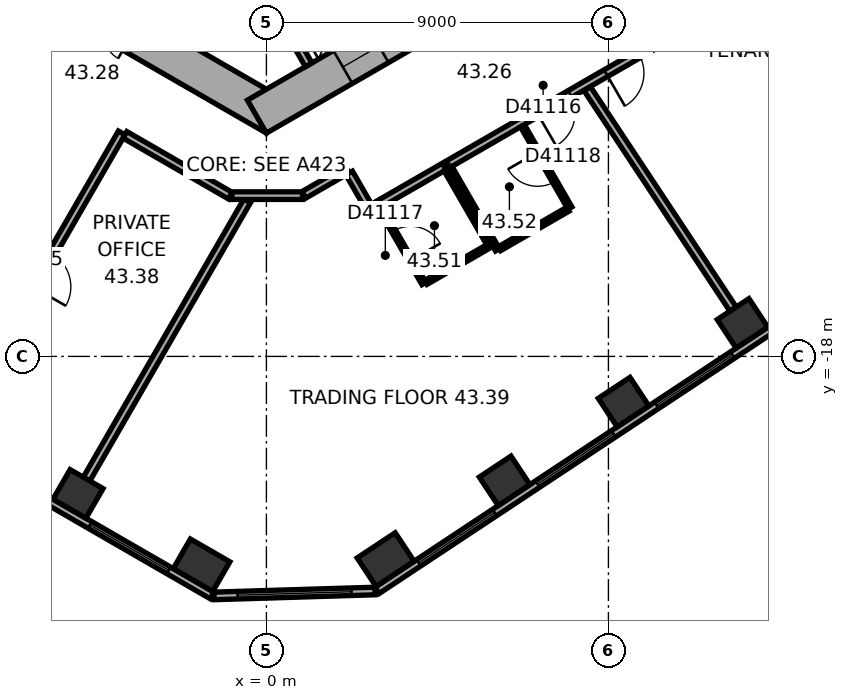
"""IFC4 building model, lengths in metres.
Left out: names, types, materials, properties, quantities, classifications, styles, units other than length and angle.
Written with IfcOpenShell. Run it as: python <this file> out.ifc"""

import sys

from ifc_helpers import new_model, si_unit, direction, frame, frame_2d, origin, origin_2d, place, context, subcontext, project, spatial, rectangle, extrude, element, fill, save


model = new_model("IFC4")
c1 = context("Model", 3, precision=1e-05, world=origin(), true_north=direction((0.0, 1.0)))
c2 = subcontext(c1, "Body", "Model", "MODEL_VIEW")
j1 = project(units=[si_unit("LENGTHUNIT", "METRE"), si_unit("PLANEANGLEUNIT", "RADIAN")], contexts=[c1])
p1 = place(None, origin())
s1 = spatial("IfcSite", under=j1, at=p1, CompositionType="ELEMENT")
p2 = place(p1, origin())
s2 = spatial("IfcBuilding", under=s1, at=p2, CompositionType="ELEMENT")
p3 = place(p2, frame((0.0, 0.0, 176.2)))
s3 = spatial("IfcBuildingStorey", under=s2, at=p3, CompositionType="ELEMENT", Elevation=176.2)
p4 = place(p3, frame((-4.958, -21.617, 0.0), z_axis=(0.0, 0.0, 1.0), x_axis=(0.866025403784, -0.5, 0.0)))
e1 = element("IfcColumn", 1, at=p4, inside=s3, PredefinedType="COLUMN", context=c2, shape_type="SweptSolid", body=[
    extrude(rectangle(XDim=1.0, YDim=0.9, at=origin_2d()), origin(), (0.0, 0.0, 1.0), 3.7),
])
for number, where, z_axis, x_axis in (
    (2, (-1.706, -23.494, 0.0), (0.0, 0.0, 1.0), (0.866, -0.5, 0.0)),
    (3, (3.137, -23.346, 0.0), (0.0, 0.0, 1.0), (0.834, 0.552, 0.0)),
):
    element("IfcColumn", number, at=place(p3, frame(where, z_axis=z_axis, x_axis=x_axis)), inside=s3, PredefinedType="COLUMN", context=c2, shape_type="SweptSolid", body=[
        extrude(rectangle(XDim=1.2, YDim=0.9, at=origin_2d()), origin(), (0.0, 0.0, 1.0), 3.7),
    ])
for number, where, z_axis, x_axis in (
    (4, (6.268, -21.274, 0.0), (0.0, 0.0, 1.0), (0.834, 0.552, 0.0)),
    (5, (9.398, -19.202, 0.0), (0.0, 0.0, 1.0), (0.834, 0.552, 0.0)),
    (6, (12.529, -17.13, 0.0), (0.0, 0.0, 1.0), (0.834, 0.552, 0.0)),
):
    element("IfcColumn", number, at=place(p3, frame(where, z_axis=z_axis, x_axis=x_axis)), inside=s3, PredefinedType="COLUMN", context=c2, shape_type="SweptSolid", body=[
        extrude(rectangle(XDim=1.0, YDim=0.9, at=origin_2d()), origin(), (0.0, 0.0, 1.0), 3.7),
    ])
p5 = place(p3, frame((-10.25, -5.629, 0.0), z_axis=(0.0, 0.0, 1.0), x_axis=(0.866022616891, -0.50000482701, 0.0)))
e7 = element("IfcWall", 7, at=p5, inside=s3, PredefinedType="SHEAR", context=c2, shape_type="SweptSolid", body=[
    extrude(rectangle(XDim=12.125, YDim=1.0, at=frame_2d((6.062, 0.0))), origin(), (0.0, 0.0, 1.0), 3.7),
])
p6 = place(p5, frame((6.262, 0.0, 0.0)))
e8 = element("IfcOpeningElement", 8, at=p6, cuts=e7, PredefinedType="OPENING", context=c2, shape_type="SweptSolid", body=[
    extrude(rectangle(XDim=1.5, YDim=2.1, at=frame_2d((0.75, 1.05))), frame((0.0, 0.51, 0.0), z_axis=(0.0, -1.0, 0.0), x_axis=(1.0, 0.0, 0.0)), (0.0, 0.0, 1.0), 1.02),
])
p7 = place(p5, frame((1.712, 0.0, 0.0)))
e9 = element("IfcOpeningElement", 9, at=p7, cuts=e7, PredefinedType="OPENING", context=c2, shape_type="SweptSolid", body=[
    extrude(rectangle(XDim=1.1, YDim=2.1, at=frame_2d((0.55, 1.05))), frame((0.0, 0.51, 0.0), z_axis=(0.0, -1.0, 0.0), x_axis=(1.0, 0.0, 0.0)), (0.0, 0.0, 1.0), 1.02),
])
p8 = place(p5, frame((4.312, 0.0, 0.0)))
e10 = element("IfcOpeningElement", 10, at=p8, cuts=e7, PredefinedType="OPENING", context=c2, shape_type="SweptSolid", body=[
    extrude(rectangle(XDim=1.1, YDim=2.1, at=frame_2d((0.55, 1.05))), frame((0.0, 0.51, 0.0), z_axis=(0.0, -1.0, 0.0), x_axis=(1.0, 0.0, 0.0)), (0.0, 0.0, 1.0), 1.02),
])
p9 = place(p3, frame((-0.25, -11.691, 0.0), z_axis=(0.0, 0.0, 1.0), x_axis=(0.866022616891, 0.50000482701, 0.0)))
e11 = element("IfcWall", 11, at=p9, inside=s3, PredefinedType="SHEAR", context=c2, shape_type="SweptSolid", body=[
    extrude(rectangle(XDim=12.125, YDim=1.0, at=frame_2d((6.062, 0.0))), origin(), (0.0, 0.0, 1.0), 3.7),
])
p10 = place(p9, frame((2.612, 0.0, 0.0)))
e12 = element("IfcOpeningElement", 12, at=p10, cuts=e11, PredefinedType="OPENING", context=c2, shape_type="SweptSolid", body=[
    extrude(rectangle(XDim=1.1, YDim=2.1, at=frame_2d((0.55, 1.05))), frame((0.0, 0.51, 0.0), z_axis=(0.0, -1.0, 0.0), x_axis=(1.0, 0.0, 0.0)), (0.0, 0.0, 1.0), 1.02),
])
p11 = place(p9, frame((5.212, 0.0, 0.0)))
e13 = element("IfcOpeningElement", 13, at=p11, cuts=e11, PredefinedType="OPENING", context=c2, shape_type="SweptSolid", body=[
    extrude(rectangle(XDim=1.1, YDim=2.1, at=frame_2d((0.55, 1.05))), frame((0.0, 0.51, 0.0), z_axis=(0.0, -1.0, 0.0), x_axis=(1.0, 0.0, 0.0)), (0.0, 0.0, 1.0), 1.02),
])
p12 = place(p9, frame((7.812, 0.0, 0.0)))
e14 = element("IfcOpeningElement", 14, at=p12, cuts=e11, PredefinedType="OPENING", context=c2, shape_type="SweptSolid", body=[
    extrude(rectangle(XDim=1.1, YDim=2.1, at=frame_2d((0.55, 1.05))), frame((0.0, 0.51, 0.0), z_axis=(0.0, -1.0, 0.0), x_axis=(1.0, 0.0, 0.0)), (0.0, 0.0, 1.0), 1.02),
])
p13 = place(p3, frame((-18.789, -14.267, 0.0), z_axis=(0.0, 0.0, 1.0), x_axis=(0.866023315909, -0.500003616288, 0.0)))
e15 = element("IfcWall", 15, at=p13, inside=s3, PredefinedType="STANDARD", context=c2, shape_type="SweptSolid", body=[
    extrude(rectangle(XDim=20.044, YDim=0.2, at=frame_2d((10.022, 0.0))), origin(), (0.0, 0.0, 1.0), 3.7),
])
p14 = place(p13, frame((1.314, 0.0, 0.9)))
e16 = element("IfcOpeningElement", 16, at=p14, cuts=e15, PredefinedType="OPENING", context=c2, shape_type="SweptSolid", body=[
    extrude(rectangle(XDim=2.4, YDim=2.0, at=frame_2d((1.2, 1.0))), frame((0.0, 0.11, 0.0), z_axis=(0.0, -1.0, 0.0), x_axis=(1.0, 0.0, 0.0)), (0.0, 0.0, 1.0), 0.22),
])
p15 = place(p13, frame((5.069, 0.0, 0.9)))
e17 = element("IfcOpeningElement", 17, at=p15, cuts=e15, PredefinedType="OPENING", context=c2, shape_type="SweptSolid", body=[
    extrude(rectangle(XDim=2.4, YDim=2.0, at=frame_2d((1.2, 1.0))), frame((0.0, 0.11, 0.0), z_axis=(0.0, -1.0, 0.0), x_axis=(1.0, 0.0, 0.0)), (0.0, 0.0, 1.0), 0.22),
])
p16 = place(p13, frame((8.823, 0.0, 0.9)))
e18 = element("IfcOpeningElement", 18, at=p16, cuts=e15, PredefinedType="OPENING", context=c2, shape_type="SweptSolid", body=[
    extrude(rectangle(XDim=2.4, YDim=2.0, at=frame_2d((1.2, 1.0))), frame((0.0, 0.11, 0.0), z_axis=(0.0, -1.0, 0.0), x_axis=(1.0, 0.0, 0.0)), (0.0, 0.0, 1.0), 0.22),
])
p17 = place(p13, frame((12.577, 0.0, 0.9)))
e19 = element("IfcOpeningElement", 19, at=p17, cuts=e15, PredefinedType="OPENING", context=c2, shape_type="SweptSolid", body=[
    extrude(rectangle(XDim=2.4, YDim=2.0, at=frame_2d((1.2, 1.0))), frame((0.0, 0.11, 0.0), z_axis=(0.0, -1.0, 0.0), x_axis=(1.0, 0.0, 0.0)), (0.0, 0.0, 1.0), 0.22),
])
p18 = place(p13, frame((16.331, 0.0, 0.9)))
e20 = element("IfcOpeningElement", 20, at=p18, cuts=e15, PredefinedType="OPENING", context=c2, shape_type="SweptSolid", body=[
    extrude(rectangle(XDim=2.4, YDim=2.0, at=frame_2d((1.2, 1.0))), frame((0.0, 0.11, 0.0), z_axis=(0.0, -1.0, 0.0), x_axis=(1.0, 0.0, 0.0)), (0.0, 0.0, 1.0), 0.22),
])
p19 = place(p3, frame((-1.378, -24.302, 0.0), z_axis=(0.0, 0.0, 1.0), x_axis=(0.999533857267, 0.030529791629, 0.0)))
e21 = element("IfcWall", 21, at=p19, inside=s3, PredefinedType="STANDARD", context=c2, shape_type="SweptSolid", body=[
    extrude(rectangle(XDim=4.238, YDim=0.2, at=frame_2d((2.119, 0.0))), origin(), (0.0, 0.0, 1.0), 3.7),
])
p20 = place(p19, frame((0.619, 0.0, 0.9)))
e22 = element("IfcOpeningElement", 22, at=p20, cuts=e21, PredefinedType="OPENING", context=c2, shape_type="SweptSolid", body=[
    extrude(rectangle(XDim=3.0, YDim=2.0, at=frame_2d((1.5, 1.0))), frame((0.0, 0.11, 0.0), z_axis=(0.0, -1.0, 0.0), x_axis=(1.0, 0.0, 0.0)), (0.0, 0.0, 1.0), 0.22),
])
p21 = place(p3, frame((2.911, -24.156, 0.0), z_axis=(0.0, 0.0, 1.0), x_axis=(0.833882163564, 0.551942512668, 0.0)))
e23 = element("IfcWall", 23, at=p21, inside=s3, PredefinedType="STANDARD", context=c2, shape_type="SweptSolid", body=[
    extrude(rectangle(XDim=20.044, YDim=0.2, at=frame_2d((10.022, 0.0))), origin(), (0.0, 0.0, 1.0), 3.7),
])
p22 = place(p21, frame((1.313, 0.0, 0.9)))
e24 = element("IfcOpeningElement", 24, at=p22, cuts=e23, PredefinedType="OPENING", context=c2, shape_type="SweptSolid", body=[
    extrude(rectangle(XDim=2.4, YDim=2.0, at=frame_2d((1.2, 1.0))), frame((0.0, 0.11, 0.0), z_axis=(0.0, -1.0, 0.0), x_axis=(1.0, 0.0, 0.0)), (0.0, 0.0, 1.0), 0.22),
])
p23 = place(p21, frame((5.067, 0.0, 0.9)))
e25 = element("IfcOpeningElement", 25, at=p23, cuts=e23, PredefinedType="OPENING", context=c2, shape_type="SweptSolid", body=[
    extrude(rectangle(XDim=2.4, YDim=2.0, at=frame_2d((1.2, 1.0))), frame((0.0, 0.11, 0.0), z_axis=(0.0, -1.0, 0.0), x_axis=(1.0, 0.0, 0.0)), (0.0, 0.0, 1.0), 0.22),
])
p24 = place(p21, frame((8.821, 0.0, 0.9)))
e26 = element("IfcOpeningElement", 26, at=p24, cuts=e23, PredefinedType="OPENING", context=c2, shape_type="SweptSolid", body=[
    extrude(rectangle(XDim=2.4, YDim=2.0, at=frame_2d((1.2, 1.0))), frame((0.0, 0.11, 0.0), z_axis=(0.0, -1.0, 0.0), x_axis=(1.0, 0.0, 0.0)), (0.0, 0.0, 1.0), 0.22),
])
p25 = place(p21, frame((12.575, 0.0, 0.9)))
e27 = element("IfcOpeningElement", 27, at=p25, cuts=e23, PredefinedType="OPENING", context=c2, shape_type="SweptSolid", body=[
    extrude(rectangle(XDim=2.4, YDim=2.0, at=frame_2d((1.2, 1.0))), frame((0.0, 0.11, 0.0), z_axis=(0.0, -1.0, 0.0), x_axis=(1.0, 0.0, 0.0)), (0.0, 0.0, 1.0), 0.22),
])
p26 = place(p21, frame((16.329, 0.0, 0.9)))
e28 = element("IfcOpeningElement", 28, at=p26, cuts=e23, PredefinedType="OPENING", context=c2, shape_type="SweptSolid", body=[
    extrude(rectangle(XDim=2.4, YDim=2.0, at=frame_2d((1.2, 1.0))), frame((0.0, 0.11, 0.0), z_axis=(0.0, -1.0, 0.0), x_axis=(1.0, 0.0, 0.0)), (0.0, 0.0, 1.0), 0.22),
])
p27 = place(p3, frame((0.013, -8.422, 0.0), z_axis=(0.0, 0.0, 1.0), x_axis=(0.500077893725, -0.86598042715, 0.0)))
e29 = element("IfcWall", 29, at=p27, inside=s3, PredefinedType="PARTITIONING", context=c2, shape_type="SweptSolid", body=[
    extrude(rectangle(XDim=2.2, YDim=0.2, at=frame_2d((1.1, 0.0))), origin(), (0.0, 0.0, 1.0), 3.42),
])
p28 = place(p3, frame((-7.984, -19.351, 0.0), z_axis=(0.0, 0.0, 1.0), x_axis=(0.500010139422, 0.866019549707, 0.0)))
e30 = element("IfcWall", 30, at=p28, inside=s3, PredefinedType="PARTITIONING", context=c2, shape_type="SweptSolid", body=[
    extrude(rectangle(XDim=8.35, YDim=0.2, at=frame_2d((4.175, 0.0))), origin(), (0.0, 0.0, 1.0), 3.42),
])
p29 = place(p28, frame((3.675, 0.0, 0.0)))
e31 = element("IfcOpeningElement", 31, at=p29, cuts=e30, PredefinedType="OPENING", context=c2, shape_type="SweptSolid", body=[
    extrude(rectangle(XDim=1.0, YDim=2.1, at=frame_2d((0.5, 1.05))), frame((0.0, 0.11, 0.0), z_axis=(0.0, -1.0, 0.0), x_axis=(1.0, 0.0, 0.0)), (0.0, 0.0, 1.0), 0.22),
])
p30 = place(p3, frame((-4.732, -21.228, 0.0), z_axis=(0.0, 0.0, 1.0), x_axis=(0.500000843414, 0.866024916838, 0.0)))
e32 = element("IfcWall", 32, at=p30, inside=s3, PredefinedType="PARTITIONING", context=c2, shape_type="SweptSolid", body=[
    extrude(rectangle(XDim=8.452, YDim=0.2, at=frame_2d((4.226, 0.0))), origin(), (0.0, 0.0, 1.0), 3.42),
])
p31 = place(p3, frame((-3.722, -12.169, 0.0), z_axis=(0.0, 0.0, 1.0), x_axis=(0.866033163891, -0.499986558861, 0.0)))
e33 = element("IfcWall", 33, at=p31, inside=s3, PredefinedType="PARTITIONING", context=c2, shape_type="SweptSolid", body=[
    extrude(rectangle(XDim=3.201, YDim=0.2, at=frame_2d((1.6, 0.0))), origin(), (0.0, 0.0, 1.0), 3.42),
])
p32 = place(p3, frame((-0.91, -13.77, 0.0), z_axis=(0.0, 0.0, 1.0), x_axis=(1.0, 0.0, 0.0)))
e34 = element("IfcWall", 34, at=p32, inside=s3, PredefinedType="PARTITIONING", context=c2, shape_type="SweptSolid", body=[
    extrude(rectangle(XDim=1.86, YDim=0.2, at=frame_2d((0.93, 0.0))), origin(), (0.0, 0.0, 1.0), 3.42),
])
p33 = place(p3, frame((0.985, -13.75, 0.0), z_axis=(0.0, 0.0, 1.0), x_axis=(0.866028661061, 0.499994358189, 0.0)))
e35 = element("IfcWall", 35, at=p33, inside=s3, PredefinedType="PARTITIONING", context=c2, shape_type="SweptSolid", body=[
    extrude(rectangle(XDim=1.321, YDim=0.2, at=frame_2d((0.661, 0.0))), origin(), (0.0, 0.0, 1.0), 3.42),
])
p34 = place(p3, frame((2.179, -13.176, 0.0), z_axis=(0.0, 0.0, 1.0), x_axis=(0.499978356969, -0.866037899034, 0.0)))
e36 = element("IfcWall", 36, at=p34, inside=s3, PredefinedType="PARTITIONING", context=c2, shape_type="SweptSolid", body=[
    extrude(rectangle(XDim=1.101, YDim=0.2, at=frame_2d((0.551, 0.0))), origin(), (0.0, 0.0, 1.0), 3.42),
])
p35 = place(p3, frame((2.946, -14.004, 0.0), z_axis=(0.0, 0.0, 1.0), x_axis=(0.866041268327, 0.499972520799, 0.0)))
e37 = element("IfcWall", 37, at=p35, inside=s3, PredefinedType="PARTITIONING", context=c2, shape_type="SweptSolid", body=[
    extrude(rectangle(XDim=2.0, YDim=0.2, at=frame_2d((1.0, 0.0))), origin(), (0.0, 0.0, 1.0), 3.42),
])
p36 = place(p3, frame((4.146, -16.083, 0.0), z_axis=(0.0, 0.0, 1.0), x_axis=(-0.499952165731, 0.866053019151, 0.0)))
e38 = element("IfcWall", 38, at=p36, inside=s3, PredefinedType="PARTITIONING", context=c2, shape_type="SweptSolid", body=[
    extrude(rectangle(XDim=2.3, YDim=0.12, at=frame_2d((1.15, 0.0))), origin(), (0.0, 0.0, 1.0), 3.42),
])
p37 = place(p36, frame((0.7, 0.0, 0.0)))
e39 = element("IfcOpeningElement", 39, at=p37, cuts=e38, PredefinedType="OPENING", context=c2, shape_type="SweptSolid", body=[
    extrude(rectangle(XDim=0.9, YDim=2.1, at=frame_2d((0.45, 1.05))), frame((0.0, 0.07, 0.0), z_axis=(0.0, -1.0, 0.0), x_axis=(1.0, 0.0, 0.0)), (0.0, 0.0, 1.0), 0.14),
])
p38 = place(p3, frame((4.728, -13.091, 0.0), z_axis=(0.0, 0.0, 1.0), x_axis=(0.500031774688, -0.866007057882, 0.0)))
e40 = element("IfcWall", 40, at=p38, inside=s3, PredefinedType="PARTITIONING", context=c2, shape_type="SweptSolid", body=[
    extrude(rectangle(XDim=2.3, YDim=0.12, at=frame_2d((1.15, 0.0))), origin(), (0.0, 0.0, 1.0), 3.42),
])
p39 = place(p3, frame((4.782, -12.944, 0.0), z_axis=(0.0, 0.0, 1.0), x_axis=(0.866022506829, 0.50000501764, 0.0)))
e41 = element("IfcWall", 41, at=p39, inside=s3, PredefinedType="PARTITIONING", context=c2, shape_type="SweptSolid", body=[
    extrude(rectangle(XDim=6.432, YDim=0.2, at=frame_2d((3.216, 0.0))), origin(), (0.0, 0.0, 1.0), 3.42),
])
p40 = place(p39, frame((2.704, 0.0, 0.0)))
e42 = element("IfcOpeningElement", 42, at=p40, cuts=e41, PredefinedType="OPENING", context=c2, shape_type="SweptSolid", body=[
    extrude(rectangle(XDim=1.0, YDim=2.1, at=frame_2d((0.5, 1.05))), frame((0.0, 0.11, 0.0), z_axis=(0.0, -1.0, 0.0), x_axis=(1.0, 0.0, 0.0)), (0.0, 0.0, 1.0), 0.22),
])
p41 = place(p39, frame((4.795, 0.0, 0.0)))
e43 = element("IfcOpeningElement", 43, at=p41, cuts=e41, PredefinedType="OPENING", context=c2, shape_type="SweptSolid", body=[
    extrude(rectangle(XDim=1.0, YDim=2.1, at=frame_2d((0.5, 1.05))), frame((0.0, 0.11, 0.0), z_axis=(0.0, -1.0, 0.0), x_axis=(1.0, 0.0, 0.0)), (0.0, 0.0, 1.0), 0.22),
])
p42 = place(p3, frame((5.826, -15.113, 0.0), z_axis=(0.0, 0.0, 1.0), x_axis=(-0.866045024864, -0.499966013754, 0.0)))
e44 = element("IfcWall", 44, at=p42, inside=s3, PredefinedType="PARTITIONING", context=c2, shape_type="SweptSolid", body=[
    extrude(rectangle(XDim=1.88, YDim=0.12, at=frame_2d((0.94, 0.0))), origin(), (0.0, 0.0, 1.0), 3.42),
])
p43 = place(p3, frame((6.082, -15.196, 0.0), z_axis=(0.0, 0.0, 1.0), x_axis=(-0.500004234368, 0.866022959057, 0.0)))
e45 = element("IfcWall", 45, at=p43, inside=s3, PredefinedType="PARTITIONING", context=c2, shape_type="SweptSolid", body=[
    extrude(rectangle(XDim=2.5, YDim=0.12, at=frame_2d((1.25, 0.0))), origin(), (0.0, 0.0, 1.0), 3.42),
])
p44 = place(p3, frame((6.737, -11.931, 0.0), z_axis=(0.0, 0.0, 1.0), x_axis=(0.500004234368, -0.866022959057, 0.0)))
e46 = element("IfcWall", 46, at=p44, inside=s3, PredefinedType="PARTITIONING", context=c2, shape_type="SweptSolid", body=[
    extrude(rectangle(XDim=2.5, YDim=0.12, at=frame_2d((1.25, 0.0))), origin(), (0.0, 0.0, 1.0), 3.42),
])
p45 = place(p44, frame((0.8, 0.0, 0.0)))
e47 = element("IfcOpeningElement", 47, at=p45, cuts=e46, PredefinedType="OPENING", context=c2, shape_type="SweptSolid", body=[
    extrude(rectangle(XDim=0.9, YDim=2.1, at=frame_2d((0.45, 1.05))), frame((0.0, 0.07, 0.0), z_axis=(0.0, -1.0, 0.0), x_axis=(1.0, 0.0, 0.0)), (0.0, 0.0, 1.0), 0.14),
])
p46 = place(p3, frame((7.935, -14.126, 0.0), z_axis=(0.0, 0.0, 1.0), x_axis=(-0.866009661879, -0.500027264788, 0.0)))
e48 = element("IfcWall", 48, at=p46, inside=s3, PredefinedType="PARTITIONING", context=c2, shape_type="SweptSolid", body=[
    extrude(rectangle(XDim=2.08, YDim=0.12, at=frame_2d((1.04, 0.0))), origin(), (0.0, 0.0, 1.0), 3.42),
])
p47 = place(p3, frame((12.281, -16.755, 0.0), z_axis=(0.0, 0.0, 1.0), x_axis=(-0.551925794663, 0.833893228888, 0.0)))
e49 = element("IfcWall", 49, at=p47, inside=s3, PredefinedType="PARTITIONING", context=c2, shape_type="SweptSolid", body=[
    extrude(rectangle(XDim=6.953, YDim=0.2, at=frame_2d((3.476, 0.0))), origin(), (0.0, 0.0, 1.0), 3.42),
])
p48 = place(p18, origin())
e50 = element("IfcWindow", 50, at=p48, inside=s3, PartitioningType="SINGLE_PANEL", PredefinedType="WINDOW", context=c2, shape_type="SweptSolid", body=[
    extrude(rectangle(XDim=2.4, YDim=2.0, at=frame_2d((1.2, 1.0))), frame((0.0, 0.03, 0.0), z_axis=(0.0, -1.0, 0.0), x_axis=(1.0, 0.0, 0.0)), (0.0, 0.0, 1.0), 0.06),
])
fill(e20, e50)
p49 = place(p20, origin())
e51 = element("IfcWindow", 51, at=p49, inside=s3, PartitioningType="SINGLE_PANEL", PredefinedType="WINDOW", context=c2, shape_type="SweptSolid", body=[
    extrude(rectangle(XDim=3.0, YDim=2.0, at=frame_2d((1.5, 1.0))), frame((0.0, 0.03, 0.0), z_axis=(0.0, -1.0, 0.0), x_axis=(1.0, 0.0, 0.0)), (0.0, 0.0, 1.0), 0.06),
])
fill(e22, e51)
p50 = place(p22, origin())
e52 = element("IfcWindow", 52, at=p50, inside=s3, PartitioningType="SINGLE_PANEL", PredefinedType="WINDOW", context=c2, shape_type="SweptSolid", body=[
    extrude(rectangle(XDim=2.4, YDim=2.0, at=frame_2d((1.2, 1.0))), frame((0.0, 0.03, 0.0), z_axis=(0.0, -1.0, 0.0), x_axis=(1.0, 0.0, 0.0)), (0.0, 0.0, 1.0), 0.06),
])
fill(e24, e52)
p51 = place(p23, origin())
e53 = element("IfcWindow", 53, at=p51, inside=s3, PartitioningType="SINGLE_PANEL", PredefinedType="WINDOW", context=c2, shape_type="SweptSolid", body=[
    extrude(rectangle(XDim=2.4, YDim=2.0, at=frame_2d((1.2, 1.0))), frame((0.0, 0.03, 0.0), z_axis=(0.0, -1.0, 0.0), x_axis=(1.0, 0.0, 0.0)), (0.0, 0.0, 1.0), 0.06),
])
fill(e25, e53)
p52 = place(p24, origin())
e54 = element("IfcWindow", 54, at=p52, inside=s3, PartitioningType="SINGLE_PANEL", PredefinedType="WINDOW", context=c2, shape_type="SweptSolid", body=[
    extrude(rectangle(XDim=2.4, YDim=2.0, at=frame_2d((1.2, 1.0))), frame((0.0, 0.03, 0.0), z_axis=(0.0, -1.0, 0.0), x_axis=(1.0, 0.0, 0.0)), (0.0, 0.0, 1.0), 0.06),
])
fill(e26, e54)
p53 = place(p10, origin())
e55 = element("IfcDoor", 55, at=p53, inside=s3, OperationType="DOUBLE_DOOR_SLIDING", PredefinedType="DOOR", context=c2, shape_type="SweptSolid", body=[
    extrude(rectangle(XDim=1.1, YDim=2.1, at=frame_2d((0.55, 1.05))), frame((0.0, 0.025, 0.0), z_axis=(0.0, -1.0, 0.0), x_axis=(1.0, 0.0, 0.0)), (0.0, 0.0, 1.0), 0.05),
])
fill(e12, e55)
p54 = place(p29, origin())
e56 = element("IfcDoor", 56, at=p54, inside=s3, OperationType="SINGLE_SWING_LEFT", PredefinedType="DOOR", context=c2, shape_type="SweptSolid", body=[
    extrude(rectangle(XDim=1.0, YDim=2.1, at=frame_2d((0.5, 1.05))), frame((0.0, 0.025, 0.0), z_axis=(0.0, -1.0, 0.0), x_axis=(1.0, 0.0, 0.0)), (0.0, 0.0, 1.0), 0.05),
])
fill(e31, e56)
p55 = place(p40, origin())
e57 = element("IfcDoor", 57, at=p55, inside=s3, OperationType="SINGLE_SWING_LEFT", PredefinedType="DOOR", context=c2, shape_type="SweptSolid", body=[
    extrude(rectangle(XDim=1.0, YDim=2.1, at=frame_2d((0.5, 1.05))), frame((0.0, 0.025, 0.0), z_axis=(0.0, -1.0, 0.0), x_axis=(1.0, 0.0, 0.0)), (0.0, 0.0, 1.0), 0.05),
])
fill(e42, e57)
p56 = place(p37, origin())
e58 = element("IfcDoor", 58, at=p56, inside=s3, OperationType="SINGLE_SWING_LEFT", PredefinedType="DOOR", context=c2, shape_type="SweptSolid", body=[
    extrude(rectangle(XDim=0.9, YDim=2.1, at=frame_2d((0.45, 1.05))), frame((0.0, 0.025, 0.0), z_axis=(0.0, -1.0, 0.0), x_axis=(1.0, 0.0, 0.0)), (0.0, 0.0, 1.0), 0.05),
])
fill(e39, e58)
p57 = place(p45, origin())
e59 = element("IfcDoor", 59, at=p57, inside=s3, OperationType="SINGLE_SWING_LEFT", PredefinedType="DOOR", context=c2, shape_type="SweptSolid", body=[
    extrude(rectangle(XDim=0.9, YDim=2.1, at=frame_2d((0.45, 1.05))), frame((0.0, 0.025, 0.0), z_axis=(0.0, -1.0, 0.0), x_axis=(1.0, 0.0, 0.0)), (0.0, 0.0, 1.0), 0.05),
])
fill(e47, e59)
p58 = place(p41, origin())
e60 = element("IfcDoor", 60, at=p58, inside=s3, OperationType="SINGLE_SWING_LEFT", PredefinedType="DOOR", context=c2, shape_type="SweptSolid", body=[
    extrude(rectangle(XDim=1.0, YDim=2.1, at=frame_2d((0.5, 1.05))), frame((0.0, 0.025, 0.0), z_axis=(0.0, -1.0, 0.0), x_axis=(1.0, 0.0, 0.0)), (0.0, 0.0, 1.0), 0.05),
])
fill(e43, e60)
save(model, sys.argv[1])
